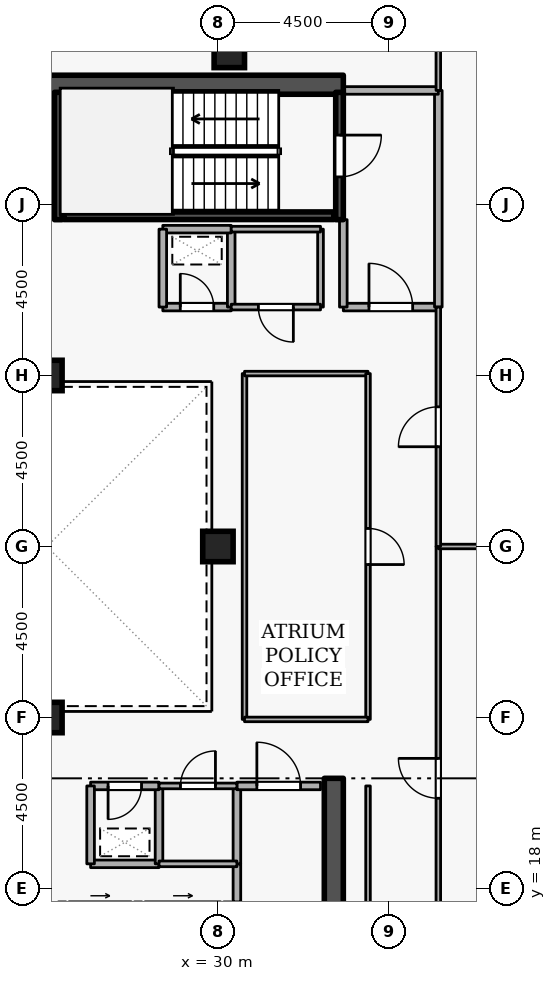
"""IFC4 building model, lengths in metres.
Left out: names, types, materials, properties, quantities, classifications, styles, units other than length and angle.
Written with IfcOpenShell. Run it as: python <this file> out.ifc"""

import sys

from ifc_helpers import new_model, si_unit, direction, frame, frame_2d, origin, origin_2d, place, context, subcontext, project, spatial, rectangle, extrude, element, fill, save


model = new_model("IFC4")
c1 = context("Model", 3, precision=1e-05, world=origin(), true_north=direction((0.0, 1.0)))
c2 = subcontext(c1, "Body", "Model", "MODEL_VIEW")
j1 = project(units=[si_unit("LENGTHUNIT", "METRE"), si_unit("PLANEANGLEUNIT", "RADIAN")], contexts=[c1])
p1 = place(None, origin())
s1 = spatial("IfcSite", under=j1, at=p1, CompositionType="ELEMENT")
p2 = place(p1, origin())
s2 = spatial("IfcBuilding", under=s1, at=p2, CompositionType="ELEMENT")
p3 = place(p2, frame((0.0, 0.0, 261.9)))
s3 = spatial("IfcBuildingStorey", under=s2, at=p3, CompositionType="ELEMENT", Elevation=261.9)
p4 = place(p3, frame((33.05, 15.1, 0.0), z_axis=(0.0, 0.0, 1.0), x_axis=(0.0, 1.0, 0.0)))
e1 = element("IfcWall", 1, at=p4, inside=s3, PredefinedType="SHEAR", context=c2, shape_type="SweptSolid", body=[
    extrude(rectangle(XDim=5.8, YDim=0.5, at=frame_2d((2.9, 0.0))), origin(), (0.0, 0.0, 1.0), 3.6),
])
p5 = place(p3, frame((17.7, 39.15, 0.0), z_axis=(0.0, 0.0, 1.0), x_axis=(1.0, 0.0, 0.0)))
e2 = element("IfcWall", 2, at=p5, inside=s3, PredefinedType="SHEAR", context=c2, shape_type="SweptSolid", body=[
    extrude(rectangle(XDim=15.6, YDim=0.5, at=frame_2d((7.8, 0.0))), origin(), (0.0, 0.0, 1.0), 3.6),
])
for number, where, z_axis, x_axis in (
    (3, (30.3, 40.0, 0.0), (0.0, 0.0, 1.0), (1.0, 0.0, 0.0)),
    (4, (25.5, 22.5, 0.0), (0.0, 0.0, 1.0), (1.0, 0.0, 0.0)),
    (5, (25.5, 31.5, 0.0), (0.0, 0.0, 1.0), (1.0, 0.0, 0.0)),
    (6, (30.0, 27.0, 0.0), (0.0, 0.0, 1.0), (1.0, 0.0, 0.0)),
):
    element("IfcColumn", number, at=place(p3, frame(where, z_axis=z_axis, x_axis=x_axis)), inside=s3, PredefinedType="COLUMN", context=c2, shape_type="SweptSolid", body=[
        extrude(rectangle(XDim=0.8, YDim=0.8, at=origin_2d()), origin(), (0.0, 0.0, 1.0), 3.6),
    ])
p6 = place(p3, frame((26.08, 17.55, 0.0), z_axis=(0.0, 0.0, 1.0), x_axis=(1.0, 0.0, 0.0)))
e7 = element("IfcWall", 7, at=p6, inside=s3, PredefinedType="STANDARD", context=c2, shape_type="SweptSolid", body=[
    extrude(rectangle(XDim=1.64, YDim=0.2, at=frame_2d((0.82, 0.0))), origin(), (0.0, 0.0, 1.0), 3.34),
])
p7 = place(p6, frame((0.31, 0.0, 0.0)))
e8 = element("IfcOpeningElement", 8, at=p7, cuts=e7, PredefinedType="OPENING", context=c2, shape_type="SweptSolid", body=[
    extrude(rectangle(XDim=1.02, YDim=2.06, at=frame_2d((0.51, 1.03))), frame((0.0, 0.11, 0.0), z_axis=(0.0, -1.0, 0.0), x_axis=(1.0, 0.0, 0.0)), (0.0, 0.0, 1.0), 0.22),
])
p8 = place(p3, frame((28.08, 17.55, 0.0), z_axis=(0.0, 0.0, 1.0), x_axis=(1.0, 0.0, 0.0)))
e9 = element("IfcWall", 9, at=p8, inside=s3, PredefinedType="STANDARD", context=c2, shape_type="SweptSolid", body=[
    extrude(rectangle(XDim=1.99, YDim=0.2, at=frame_2d((0.995, 0.0))), origin(), (0.0, 0.0, 1.0), 3.34),
])
p9 = place(p8, frame((0.485, 0.0, 0.0)))
e10 = element("IfcOpeningElement", 10, at=p9, cuts=e9, PredefinedType="OPENING", context=c2, shape_type="SweptSolid", body=[
    extrude(rectangle(XDim=1.02, YDim=2.06, at=frame_2d((0.51, 1.03))), frame((0.0, 0.11, 0.0), z_axis=(0.0, -1.0, 0.0), x_axis=(1.0, 0.0, 0.0)), (0.0, 0.0, 1.0), 0.22),
])
p10 = place(p3, frame((33.2, 38.95, 0.0), z_axis=(0.0, 0.0, 1.0), x_axis=(0.0, -1.0, 0.0)))
e11 = element("IfcWall", 11, at=p10, inside=s3, PredefinedType="SHEAR", context=c2, shape_type="SweptSolid", body=[
    extrude(rectangle(XDim=3.35, YDim=0.2, at=frame_2d((1.675, 0.0))), origin(), (0.0, 0.0, 1.0), 3.6),
])
p11 = place(p10, frame((1.125, 0.0, 0.0)))
e12 = element("IfcOpeningElement", 12, at=p11, cuts=e11, PredefinedType="OPENING", context=c2, shape_type="SweptSolid", body=[
    extrude(rectangle(XDim=1.1, YDim=2.1, at=frame_2d((0.55, 1.05))), frame((0.0, 0.11, 0.0), z_axis=(0.0, -1.0, 0.0), x_axis=(1.0, 0.0, 0.0)), (0.0, 0.0, 1.0), 0.22),
])
p12 = place(p3, frame((25.8, 35.6, 0.0), z_axis=(0.0, 0.0, 1.0), x_axis=(0.0, 1.0, 0.0)))
e13 = element("IfcWall", 13, at=p12, inside=s3, PredefinedType="SHEAR", context=c2, shape_type="SweptSolid", body=[
    extrude(rectangle(XDim=3.35, YDim=0.2, at=frame_2d((1.675, 0.0))), origin(), (0.0, 0.0, 1.0), 3.6),
])
p13 = place(p3, frame((25.95, 35.703, 0.0), z_axis=(0.0, 0.0, 1.0), x_axis=(1.0, 0.0, 0.0)))
e14 = element("IfcWall", 14, at=p13, inside=s3, PredefinedType="SHEAR", context=c2, shape_type="SweptSolid", body=[
    extrude(rectangle(XDim=7.1, YDim=0.2, at=frame_2d((3.55, 0.0))), origin(), (0.0, 0.0, 1.0), 3.6),
])
p14 = place(p3, frame((33.3, 33.3, 0.0), z_axis=(0.0, 0.0, 1.0), x_axis=(1.0, 0.0, 0.0)))
e15 = element("IfcWall", 15, at=p14, inside=s3, PredefinedType="STANDARD", context=c2, shape_type="SweptSolid", body=[
    extrude(rectangle(XDim=2.5, YDim=0.2, at=frame_2d((1.25, 0.0))), origin(), (0.0, 0.0, 1.0), 3.34),
])
p15 = place(p14, frame((0.675, 0.0, 0.0)))
e16 = element("IfcOpeningElement", 16, at=p15, cuts=e15, PredefinedType="OPENING", context=c2, shape_type="SweptSolid", body=[
    extrude(rectangle(XDim=1.15, YDim=2.1, at=frame_2d((0.575, 1.05))), frame((0.0, 0.11, 0.0), z_axis=(0.0, -1.0, 0.0), x_axis=(1.0, 0.0, 0.0)), (0.0, 0.0, 1.0), 0.22),
])
p16 = place(p3, frame((35.8, 33.3, 0.0), z_axis=(0.0, 0.0, 1.0), x_axis=(0.0, 1.0, 0.0)))
e17 = element("IfcWall", 17, at=p16, inside=s3, PredefinedType="STANDARD", context=c2, shape_type="SweptSolid", body=[
    extrude(rectangle(XDim=5.7, YDim=0.2, at=frame_2d((2.85, 0.0))), origin(), (0.0, 0.0, 1.0), 3.34),
])
p17 = place(p3, frame((35.8, 39.0, 0.0), z_axis=(0.0, 0.0, 1.0), x_axis=(-1.0, 0.0, 0.0)))
e18 = element("IfcWall", 18, at=p17, inside=s3, PredefinedType="STANDARD", context=c2, shape_type="SweptSolid", body=[
    extrude(rectangle(XDim=2.5, YDim=0.2, at=frame_2d((1.25, 0.0))), origin(), (0.0, 0.0, 1.0), 3.34),
])
p18 = place(p3, frame((33.3, 35.6, 0.0), z_axis=(0.0, 0.0, 1.0), x_axis=(0.0, -1.0, 0.0)))
e19 = element("IfcWall", 19, at=p18, inside=s3, PredefinedType="STANDARD", context=c2, shape_type="SweptSolid", body=[
    extrude(rectangle(XDim=2.3, YDim=0.2, at=frame_2d((1.15, 0.0))), origin(), (0.0, 0.0, 1.0), 2.545),
])
p19 = place(p3, frame((26.65, 18.65, 0.0), z_axis=(0.0, 0.0, 1.0), x_axis=(1.0, 0.0, 0.0)))
e20 = element("IfcWall", 20, at=p19, inside=s3, PredefinedType="STANDARD", context=c2, shape_type="SweptSolid", body=[
    extrude(rectangle(XDim=1.8, YDim=0.2, at=frame_2d((0.9, 0.0))), origin(), (0.0, 0.0, 1.0), 3.34),
])
p20 = place(p3, frame((28.45, 18.65, 0.0), z_axis=(0.0, 0.0, 1.0), x_axis=(0.0, 1.0, 0.0)))
e21 = element("IfcWall", 21, at=p20, inside=s3, PredefinedType="STANDARD", context=c2, shape_type="SweptSolid", body=[
    extrude(rectangle(XDim=2.05, YDim=0.2, at=frame_2d((1.025, 0.0))), origin(), (0.0, 0.0, 1.0), 3.34),
])
p21 = place(p3, frame((28.45, 20.7, 0.0), z_axis=(0.0, 0.0, 1.0), x_axis=(-1.0, 0.0, 0.0)))
e22 = element("IfcWall", 22, at=p21, inside=s3, PredefinedType="STANDARD", context=c2, shape_type="SweptSolid", body=[
    extrude(rectangle(XDim=1.8, YDim=0.2, at=frame_2d((0.9, 0.0))), origin(), (0.0, 0.0, 1.0), 3.34),
])
p22 = place(p21, frame((0.46, 0.0, 0.0)))
e23 = element("IfcOpeningElement", 23, at=p22, cuts=e22, PredefinedType="OPENING", context=c2, shape_type="SweptSolid", body=[
    extrude(rectangle(XDim=0.88, YDim=2.04, at=frame_2d((0.44, 1.02))), frame((0.0, 0.11, 0.0), z_axis=(0.0, -1.0, 0.0), x_axis=(1.0, 0.0, 0.0)), (0.0, 0.0, 1.0), 0.22),
])
p23 = place(p3, frame((26.65, 20.7, 0.0), z_axis=(0.0, 0.0, 1.0), x_axis=(0.0, -1.0, 0.0)))
e24 = element("IfcWall", 24, at=p23, inside=s3, PredefinedType="STANDARD", context=c2, shape_type="SweptSolid", body=[
    extrude(rectangle(XDim=2.05, YDim=0.2, at=frame_2d((1.025, 0.0))), origin(), (0.0, 0.0, 1.0), 3.34),
])
p24 = place(p3, frame((28.55, 33.3, 0.0), z_axis=(0.0, 0.0, 1.0), x_axis=(1.0, 0.0, 0.0)))
e25 = element("IfcWall", 25, at=p24, inside=s3, PredefinedType="STANDARD", context=c2, shape_type="SweptSolid", body=[
    extrude(rectangle(XDim=1.8, YDim=0.2, at=frame_2d((0.9, 0.0))), origin(), (0.0, 0.0, 1.0), 3.34),
])
p25 = place(p24, frame((0.46, 0.0, 0.0)))
e26 = element("IfcOpeningElement", 26, at=p25, cuts=e25, PredefinedType="OPENING", context=c2, shape_type="SweptSolid", body=[
    extrude(rectangle(XDim=0.88, YDim=2.04, at=frame_2d((0.44, 1.02))), frame((0.0, 0.11, 0.0), z_axis=(0.0, -1.0, 0.0), x_axis=(1.0, 0.0, 0.0)), (0.0, 0.0, 1.0), 0.22),
])
p26 = place(p3, frame((30.35, 33.3, 0.0), z_axis=(0.0, 0.0, 1.0), x_axis=(0.0, 1.0, 0.0)))
e27 = element("IfcWall", 27, at=p26, inside=s3, PredefinedType="STANDARD", context=c2, shape_type="SweptSolid", body=[
    extrude(rectangle(XDim=2.05, YDim=0.2, at=frame_2d((1.025, 0.0))), origin(), (0.0, 0.0, 1.0), 3.34),
])
p27 = place(p3, frame((30.35, 35.35, 0.0), z_axis=(0.0, 0.0, 1.0), x_axis=(-1.0, 0.0, 0.0)))
e28 = element("IfcWall", 28, at=p27, inside=s3, PredefinedType="STANDARD", context=c2, shape_type="SweptSolid", body=[
    extrude(rectangle(XDim=1.8, YDim=0.2, at=frame_2d((0.9, 0.0))), origin(), (0.0, 0.0, 1.0), 3.34),
])
p28 = place(p3, frame((28.55, 35.35, 0.0), z_axis=(0.0, 0.0, 1.0), x_axis=(0.0, -1.0, 0.0)))
e29 = element("IfcWall", 29, at=p28, inside=s3, PredefinedType="STANDARD", context=c2, shape_type="SweptSolid", body=[
    extrude(rectangle(XDim=2.05, YDim=0.2, at=frame_2d((1.025, 0.0))), origin(), (0.0, 0.0, 1.0), 3.34),
])
p29 = place(p3, frame((30.5, 17.648, 0.0), z_axis=(0.0, 0.0, 1.0), x_axis=(0.0, 1.0, 0.0)))
e30 = element("IfcWall", 30, at=p29, inside=s3, PredefinedType="STANDARD", context=c2, shape_type="SweptSolid", body=[
    extrude(rectangle(XDim=1.002, YDim=0.2, at=frame_2d((0.501, 0.0))), origin(), (0.0, 0.0, 1.0), 3.34),
])
p30 = place(p3, frame((30.5, 18.65, 0.0), z_axis=(0.0, 0.0, 1.0), x_axis=(0.0, 1.0, 0.0)))
e31 = element("IfcWall", 31, at=p30, inside=s3, PredefinedType="STANDARD", context=c2, shape_type="SweptSolid", body=[
    extrude(rectangle(XDim=2.05, YDim=0.2, at=frame_2d((1.025, 0.0))), origin(), (0.0, 0.0, 1.0), 3.34),
])
p31 = place(p3, frame((30.5, 20.7, 0.0), z_axis=(0.0, 0.0, 1.0), x_axis=(1.0, 0.0, 0.0)))
e32 = element("IfcWall", 32, at=p31, inside=s3, PredefinedType="STANDARD", context=c2, shape_type="SweptSolid", body=[
    extrude(rectangle(XDim=2.2, YDim=0.2, at=frame_2d((1.1, 0.0))), origin(), (0.0, 0.0, 1.0), 3.34),
])
p32 = place(p31, frame((0.525, 0.0, 0.0)))
e33 = element("IfcOpeningElement", 33, at=p32, cuts=e32, PredefinedType="OPENING", context=c2, shape_type="SweptSolid", body=[
    extrude(rectangle(XDim=1.15, YDim=2.1, at=frame_2d((0.575, 1.05))), frame((0.0, 0.11, 0.0), z_axis=(0.0, -1.0, 0.0), x_axis=(1.0, 0.0, 0.0)), (0.0, 0.0, 1.0), 0.22),
])
p33 = place(p3, frame((30.5, 18.65, 0.0), z_axis=(0.0, 0.0, 1.0), x_axis=(-1.0, 0.0, 0.0)))
e34 = element("IfcWall", 34, at=p33, inside=s3, PredefinedType="PARTITIONING", context=c2, shape_type="SweptSolid", body=[
    extrude(rectangle(XDim=2.05, YDim=0.15, at=frame_2d((1.025, 0.0))), origin(), (0.0, 0.0, 1.0), 3.34),
])
p34 = place(p3, frame((28.45, 20.7, 0.0), z_axis=(0.0, 0.0, 1.0), x_axis=(1.0, 0.0, 0.0)))
e35 = element("IfcWall", 35, at=p34, inside=s3, PredefinedType="PARTITIONING", context=c2, shape_type="SweptSolid", body=[
    extrude(rectangle(XDim=2.05, YDim=0.15, at=frame_2d((1.025, 0.0))), origin(), (0.0, 0.0, 1.0), 3.34),
])
p35 = place(p34, frame((0.565, 0.0, 0.0)))
e36 = element("IfcOpeningElement", 36, at=p35, cuts=e35, PredefinedType="OPENING", context=c2, shape_type="SweptSolid", body=[
    extrude(rectangle(XDim=0.92, YDim=2.08, at=frame_2d((0.46, 1.04))), frame((0.0, 0.085, 0.0), z_axis=(0.0, -1.0, 0.0), x_axis=(1.0, 0.0, 0.0)), (0.0, 0.0, 1.0), 0.17),
])
p36 = place(p3, frame((32.7, 35.35, 0.0), z_axis=(0.0, 0.0, 1.0), x_axis=(0.0, -1.0, 0.0)))
e37 = element("IfcWall", 37, at=p36, inside=s3, PredefinedType="PARTITIONING", context=c2, shape_type="SweptSolid", body=[
    extrude(rectangle(XDim=2.05, YDim=0.15, at=frame_2d((1.025, 0.0))), origin(), (0.0, 0.0, 1.0), 2.545),
])
p37 = place(p3, frame((32.7, 33.3, 0.0), z_axis=(0.0, 0.0, 1.0), x_axis=(-1.0, 0.0, 0.0)))
e38 = element("IfcWall", 38, at=p37, inside=s3, PredefinedType="PARTITIONING", context=c2, shape_type="SweptSolid", body=[
    extrude(rectangle(XDim=2.35, YDim=0.15, at=frame_2d((1.175, 0.0))), origin(), (0.0, 0.0, 1.0), 3.34),
])
p38 = place(p37, frame((0.715, 0.0, 0.0)))
e39 = element("IfcOpeningElement", 39, at=p38, cuts=e38, PredefinedType="OPENING", context=c2, shape_type="SweptSolid", body=[
    extrude(rectangle(XDim=0.92, YDim=2.08, at=frame_2d((0.46, 1.04))), frame((0.0, 0.085, 0.0), z_axis=(0.0, -1.0, 0.0), x_axis=(1.0, 0.0, 0.0)), (0.0, 0.0, 1.0), 0.17),
])
p39 = place(p3, frame((30.35, 35.35, 0.0), z_axis=(0.0, 0.0, 1.0), x_axis=(1.0, 0.0, 0.0)))
e40 = element("IfcWall", 40, at=p39, inside=s3, PredefinedType="PARTITIONING", context=c2, shape_type="SweptSolid", body=[
    extrude(rectangle(XDim=2.35, YDim=0.15, at=frame_2d((1.175, 0.0))), origin(), (0.0, 0.0, 1.0), 3.34),
])
p40 = place(p3, frame((33.95, 20.7, 0.0), z_axis=(0.0, 0.0, 1.0), x_axis=(0.0, -1.0, 0.0)))
e41 = element("IfcWall", 41, at=p40, inside=s3, PredefinedType="PARTITIONING", context=c2, shape_type="SweptSolid", body=[
    extrude(rectangle(XDim=5.9, YDim=0.12, at=frame_2d((2.95, 0.0))), origin(), (0.0, 0.0, 1.0), 3.34),
])
p41 = place(p3, frame((35.8, 14.8, 0.0), z_axis=(0.0, 0.0, 1.0), x_axis=(0.0, 1.0, 0.0)))
e42 = element("IfcWall", 42, at=p41, inside=s3, PredefinedType="PARTITIONING", context=c2, shape_type="SweptSolid", body=[
    extrude(rectangle(XDim=12.2, YDim=0.12, at=frame_2d((6.1, 0.0))), origin(), (0.0, 0.0, 1.0), 3.34),
])
p42 = place(p41, frame((5.575, 0.0, 0.0)))
e43 = element("IfcOpeningElement", 43, at=p42, cuts=e42, PredefinedType="OPENING", context=c2, shape_type="SweptSolid", body=[
    extrude(rectangle(XDim=1.05, YDim=2.1, at=frame_2d((0.525, 1.05))), frame((0.0, 0.07, 0.0), z_axis=(0.0, -1.0, 0.0), x_axis=(1.0, 0.0, 0.0)), (0.0, 0.0, 1.0), 0.14),
])
p43 = place(p3, frame((35.8, 27.0, 0.0), z_axis=(0.0, 0.0, 1.0), x_axis=(1.0, 0.0, 0.0)))
e44 = element("IfcWall", 44, at=p43, inside=s3, PredefinedType="PARTITIONING", context=c2, shape_type="SweptSolid", body=[
    extrude(rectangle(XDim=13.42, YDim=0.12, at=frame_2d((6.71, 0.0))), origin(), (0.0, 0.0, 1.0), 2.932),
])
p44 = place(p3, frame((35.8, 39.0, 0.0), z_axis=(0.0, 0.0, 1.0), x_axis=(0.0, 1.0, 0.0)))
e45 = element("IfcWall", 45, at=p44, inside=s3, PredefinedType="PARTITIONING", context=c2, shape_type="SweptSolid", body=[
    extrude(rectangle(XDim=5.72, YDim=0.12, at=frame_2d((2.86, 0.0))), origin(), (0.0, 0.0, 1.0), 3.34),
])
p45 = place(p3, frame((35.8, 27.0, 0.0), z_axis=(0.0, 0.0, 1.0), x_axis=(0.0, 1.0, 0.0)))
e46 = element("IfcWall", 46, at=p45, inside=s3, PredefinedType="PARTITIONING", context=c2, shape_type="SweptSolid", body=[
    extrude(rectangle(XDim=6.3, YDim=0.12, at=frame_2d((3.15, 0.0))), origin(), (0.0, 0.0, 1.0), 3.34),
])
p46 = place(p45, frame((2.625, 0.0, 0.0)))
e47 = element("IfcOpeningElement", 47, at=p46, cuts=e46, PredefinedType="OPENING", context=c2, shape_type="SweptSolid", body=[
    extrude(rectangle(XDim=1.05, YDim=2.1, at=frame_2d((0.525, 1.05))), frame((0.0, 0.07, 0.0), z_axis=(0.0, -1.0, 0.0), x_axis=(1.0, 0.0, 0.0)), (0.0, 0.0, 1.0), 0.14),
])
p47 = place(p3, frame((30.7, 22.45, 0.0), z_axis=(0.0, 0.0, 1.0), x_axis=(0.0, 1.0, 0.0)))
e48 = element("IfcWall", 48, at=p47, inside=s3, PredefinedType="PARTITIONING", context=c2, shape_type="SweptSolid", body=[
    extrude(rectangle(XDim=9.1, YDim=0.12, at=frame_2d((4.55, 0.0))), origin(), (0.0, 0.0, 1.0), 3.34),
])
p48 = place(p3, frame((30.7, 31.55, 0.0), z_axis=(0.0, 0.0, 1.0), x_axis=(1.0, 0.0, 0.0)))
e49 = element("IfcWall", 49, at=p48, inside=s3, PredefinedType="PARTITIONING", context=c2, shape_type="SweptSolid", body=[
    extrude(rectangle(XDim=3.25, YDim=0.12, at=frame_2d((1.625, 0.0))), origin(), (0.0, 0.0, 1.0), 3.34),
])
p49 = place(p3, frame((33.95, 31.55, 0.0), z_axis=(0.0, 0.0, 1.0), x_axis=(0.0, -1.0, 0.0)))
e50 = element("IfcWall", 50, at=p49, inside=s3, PredefinedType="PARTITIONING", context=c2, shape_type="SweptSolid", body=[
    extrude(rectangle(XDim=9.1, YDim=0.12, at=frame_2d((4.55, 0.0))), origin(), (0.0, 0.0, 1.0), 3.34),
])
p50 = place(p49, frame((4.075, 0.0, 0.0)))
e51 = element("IfcOpeningElement", 51, at=p50, cuts=e50, PredefinedType="OPENING", context=c2, shape_type="SweptSolid", body=[
    extrude(rectangle(XDim=0.95, YDim=2.1, at=frame_2d((0.475, 1.05))), frame((0.0, 0.07, 0.0), z_axis=(0.0, -1.0, 0.0), x_axis=(1.0, 0.0, 0.0)), (0.0, 0.0, 1.0), 0.14),
])
p51 = place(p3, frame((33.95, 22.45, 0.0), z_axis=(0.0, 0.0, 1.0), x_axis=(-1.0, 0.0, 0.0)))
e52 = element("IfcWall", 52, at=p51, inside=s3, PredefinedType="PARTITIONING", context=c2, shape_type="SweptSolid", body=[
    extrude(rectangle(XDim=3.25, YDim=0.12, at=frame_2d((1.625, 0.0))), origin(), (0.0, 0.0, 1.0), 3.34),
])
p52 = place(p11, origin())
e53 = element("IfcDoor", 53, at=p52, inside=s3, OperationType="SINGLE_SWING_LEFT", PredefinedType="DOOR", context=c2, shape_type="SweptSolid", body=[
    extrude(rectangle(XDim=1.1, YDim=2.1, at=frame_2d((0.55, 1.05))), frame((0.0, 0.025, 0.0), z_axis=(0.0, -1.0, 0.0), x_axis=(1.0, 0.0, 0.0)), (0.0, 0.0, 1.0), 0.05),
])
fill(e12, e53)
p53 = place(p15, origin())
e54 = element("IfcDoor", 54, at=p53, inside=s3, OperationType="SINGLE_SWING_LEFT", PredefinedType="DOOR", context=c2, shape_type="SweptSolid", body=[
    extrude(rectangle(XDim=1.15, YDim=2.1, at=frame_2d((0.575, 1.05))), frame((0.0, 0.025, 0.0), z_axis=(0.0, -1.0, 0.0), x_axis=(1.0, 0.0, 0.0)), (0.0, 0.0, 1.0), 0.05),
])
fill(e16, e54)
p54 = place(p22, origin())
e55 = element("IfcDoor", 55, at=p54, inside=s3, OperationType="SINGLE_SWING_RIGHT", PredefinedType="DOOR", context=c2, shape_type="SweptSolid", body=[
    extrude(rectangle(XDim=0.88, YDim=2.04, at=frame_2d((0.44, 1.02))), frame((0.0, 0.025, 0.0), z_axis=(0.0, -1.0, 0.0), x_axis=(1.0, 0.0, 0.0)), (0.0, 0.0, 1.0), 0.05),
])
fill(e23, e55)
p55 = place(p25, origin())
e56 = element("IfcDoor", 56, at=p55, inside=s3, OperationType="SINGLE_SWING_LEFT", PredefinedType="DOOR", context=c2, shape_type="SweptSolid", body=[
    extrude(rectangle(XDim=0.88, YDim=2.04, at=frame_2d((0.44, 1.02))), frame((0.0, 0.025, 0.0), z_axis=(0.0, -1.0, 0.0), x_axis=(1.0, 0.0, 0.0)), (0.0, 0.0, 1.0), 0.05),
])
fill(e26, e56)
p56 = place(p35, origin())
e57 = element("IfcDoor", 57, at=p56, inside=s3, OperationType="SINGLE_SWING_RIGHT", PredefinedType="DOOR", context=c2, shape_type="SweptSolid", body=[
    extrude(rectangle(XDim=0.92, YDim=2.08, at=frame_2d((0.46, 1.04))), frame((0.0, 0.025, 0.0), z_axis=(0.0, -1.0, 0.0), x_axis=(1.0, 0.0, 0.0)), (0.0, 0.0, 1.0), 0.05),
])
fill(e36, e57)
p57 = place(p32, origin())
e58 = element("IfcDoor", 58, at=p57, inside=s3, OperationType="SINGLE_SWING_LEFT", PredefinedType="DOOR", context=c2, shape_type="SweptSolid", body=[
    extrude(rectangle(XDim=1.15, YDim=2.1, at=frame_2d((0.575, 1.05))), frame((0.0, 0.025, 0.0), z_axis=(0.0, -1.0, 0.0), x_axis=(1.0, 0.0, 0.0)), (0.0, 0.0, 1.0), 0.05),
])
fill(e33, e58)
p58 = place(p38, origin())
e59 = element("IfcDoor", 59, at=p58, inside=s3, OperationType="SINGLE_SWING_LEFT", PredefinedType="DOOR", context=c2, shape_type="SweptSolid", body=[
    extrude(rectangle(XDim=0.92, YDim=2.08, at=frame_2d((0.46, 1.04))), frame((0.0, 0.025, 0.0), z_axis=(0.0, -1.0, 0.0), x_axis=(1.0, 0.0, 0.0)), (0.0, 0.0, 1.0), 0.05),
])
fill(e39, e59)
p59 = place(p42, origin())
e60 = element("IfcDoor", 60, at=p59, inside=s3, OperationType="SINGLE_SWING_RIGHT", PredefinedType="DOOR", context=c2, shape_type="SweptSolid", body=[
    extrude(rectangle(XDim=1.05, YDim=2.1, at=frame_2d((0.525, 1.05))), frame((0.0, 0.025, 0.0), z_axis=(0.0, -1.0, 0.0), x_axis=(1.0, 0.0, 0.0)), (0.0, 0.0, 1.0), 0.05),
])
fill(e43, e60)
p60 = place(p46, origin())
e61 = element("IfcDoor", 61, at=p60, inside=s3, OperationType="SINGLE_SWING_LEFT", PredefinedType="DOOR", context=c2, shape_type="SweptSolid", body=[
    extrude(rectangle(XDim=1.05, YDim=2.1, at=frame_2d((0.525, 1.05))), frame((0.0, 0.025, 0.0), z_axis=(0.0, -1.0, 0.0), x_axis=(1.0, 0.0, 0.0)), (0.0, 0.0, 1.0), 0.05),
])
fill(e47, e61)
p61 = place(p50, origin())
e62 = element("IfcDoor", 62, at=p61, inside=s3, OperationType="SINGLE_SWING_RIGHT", PredefinedType="DOOR", context=c2, shape_type="SweptSolid", body=[
    extrude(rectangle(XDim=0.95, YDim=2.1, at=frame_2d((0.475, 1.05))), frame((0.0, 0.025, 0.0), z_axis=(0.0, -1.0, 0.0), x_axis=(1.0, 0.0, 0.0)), (0.0, 0.0, 1.0), 0.05),
])
fill(e51, e62)
save(model, sys.argv[1])
